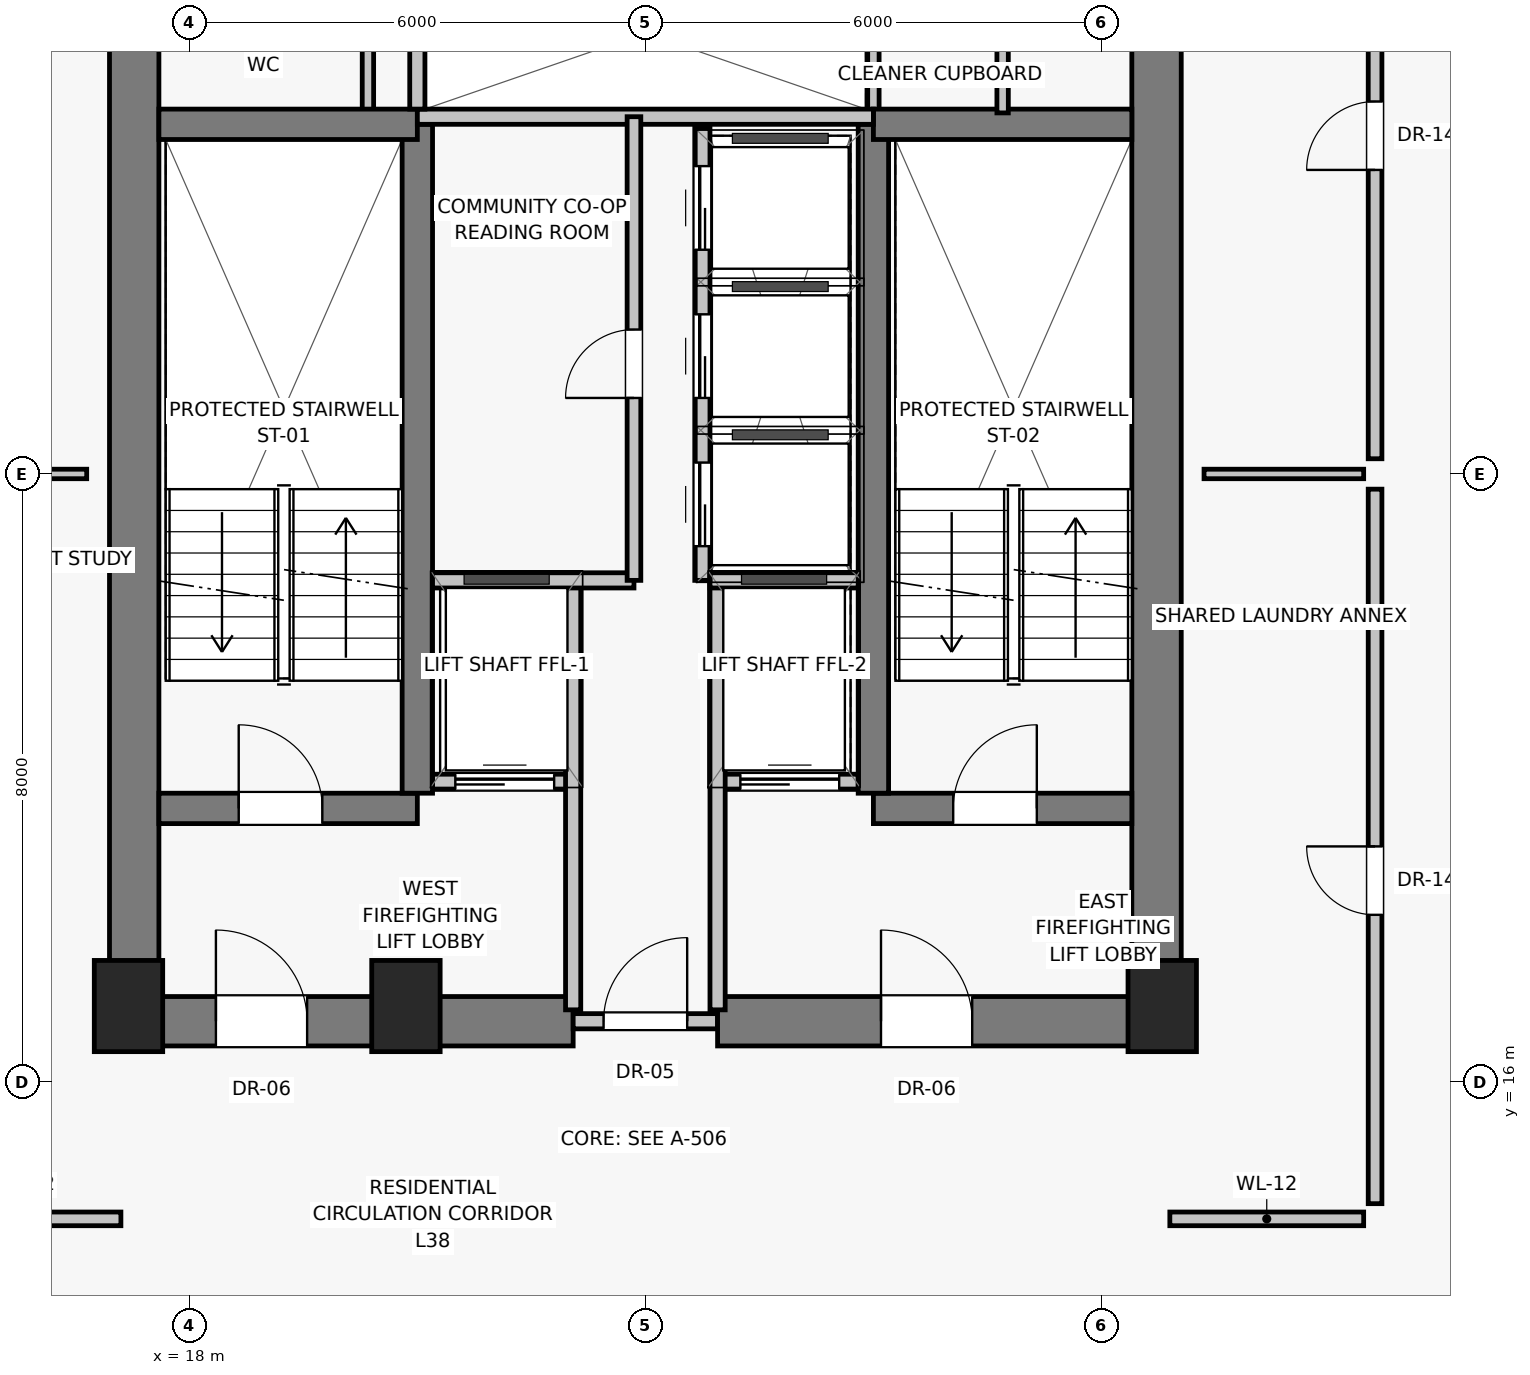
"""IFC4 building model, lengths in metres.
Left out: names, types, materials, properties, quantities, classifications, styles, units other than length and angle.
Written with IfcOpenShell. Run it as: python <this file> out.ifc"""

import sys

from ifc_helpers import new_model, si_unit, direction, frame, frame_2d, origin, origin_2d, place, context, subcontext, project, spatial, rectangle, extrude, source, transform, mapped, element, fill, save


model = new_model("IFC4")
c1 = context("Model", 3, precision=1e-05, world=origin(), true_north=direction((0.0, 1.0)))
c2 = subcontext(c1, "Body", "Model", "MODEL_VIEW")
j1 = project(units=[si_unit("LENGTHUNIT", "METRE"), si_unit("PLANEANGLEUNIT", "RADIAN")], contexts=[c1])
p1 = place(None, origin())
s1 = spatial("IfcSite", under=j1, at=p1, CompositionType="ELEMENT")
p2 = place(p1, origin())
s2 = spatial("IfcBuilding", under=s1, at=p2, CompositionType="ELEMENT")
p3 = place(p2, frame((0.0, 0.0, 136.0)))
s3 = spatial("IfcBuildingStorey", under=s2, at=p3, CompositionType="ELEMENT", Elevation=136.0)
for number, where, z_axis, x_axis in (
    (1, (17.2, 17.0, 0.0), (0.0, 0.0, 1.0), (1.0, 0.0, 0.0)),
    (2, (20.85, 17.0, 0.0), (0.0, 0.0, 1.0), (1.0, 0.0, 0.0)),
    (3, (30.8, 17.0, 0.0), (0.0, 0.0, 1.0), (1.0, 0.0, 0.0)),
):
    element("IfcColumn", number, at=place(p3, frame(where, z_axis=z_axis, x_axis=x_axis)), inside=s3, PredefinedType="PILASTER", context=c2, shape_type="SweptSolid", body=[
        extrude(rectangle(XDim=0.9, YDim=1.2, at=origin_2d()), origin(), (0.0, 0.0, 1.0), 3.25),
    ])
for number, where, z_axis, x_axis in (
    (4, (17.275, 16.8, 0.0), (0.0, 0.0, 1.0), (0.0, 1.0, 0.0)),
    (5, (30.725, 16.8, 0.0), (0.0, 0.0, 1.0), (0.0, 1.0, 0.0)),
):
    element("IfcWall", number, at=place(p3, frame(where, z_axis=z_axis, x_axis=x_axis)), inside=s3, PredefinedType="SHEAR", context=c2, shape_type="SweptSolid", body=[
        extrude(rectangle(XDim=14.2, YDim=0.65, at=frame_2d((7.1, 0.0))), origin(), (0.0, 0.0, 1.0), 3.0),
    ])
p4 = place(p3, frame((17.2, 16.8, 0.0), z_axis=(0.0, 0.0, 1.0), x_axis=(1.0, 0.0, 0.0)))
e6 = element("IfcWall", 6, at=p4, inside=s3, PredefinedType="SHEAR", context=c2, shape_type="SweptSolid", body=[
    extrude(rectangle(XDim=5.85, YDim=0.65, at=frame_2d((2.925, 0.0))), origin(), (0.0, 0.0, 1.0), 3.0),
])
p5 = place(p4, frame((1.15, 0.0, 0.0)))
e7 = element("IfcOpeningElement", 7, at=p5, cuts=e6, PredefinedType="OPENING", context=c2, shape_type="SweptSolid", body=[
    extrude(rectangle(XDim=1.2, YDim=2.03, at=frame_2d((0.6, 1.015))), frame((0.0, 0.335, 0.0), z_axis=(0.0, -1.0, 0.0), x_axis=(1.0, 0.0, 0.0)), (0.0, 0.0, 1.0), 0.67),
])
p6 = place(p3, frame((23.05, 16.8, 0.0), z_axis=(0.0, 0.0, 1.0), x_axis=(1.0, 0.0, 0.0)))
e8 = element("IfcWall", 8, at=p6, inside=s3, PredefinedType="SOLIDWALL", context=c2, shape_type="SweptSolid", body=[
    extrude(rectangle(XDim=1.9, YDim=0.2, at=frame_2d((0.95, 0.0))), origin(), (0.0, 0.0, 1.0), 2.15),
])
p7 = place(p6, frame((0.4, 0.0, 0.0)))
e9 = element("IfcOpeningElement", 9, at=p7, cuts=e8, PredefinedType="OPENING", context=c2, shape_type="SweptSolid", body=[
    extrude(rectangle(XDim=1.1, YDim=2.03, at=frame_2d((0.55, 1.015))), frame((0.0, 0.11, 0.0), z_axis=(0.0, -1.0, 0.0), x_axis=(1.0, 0.0, 0.0)), (0.0, 0.0, 1.0), 0.22),
])
p8 = place(p3, frame((24.95, 16.8, 0.0), z_axis=(0.0, 0.0, 1.0), x_axis=(1.0, 0.0, 0.0)))
e10 = element("IfcWall", 10, at=p8, inside=s3, PredefinedType="SHEAR", context=c2, shape_type="SweptSolid", body=[
    extrude(rectangle(XDim=5.85, YDim=0.65, at=frame_2d((2.925, 0.0))), origin(), (0.0, 0.0, 1.0), 3.0),
])
p9 = place(p8, frame((2.15, 0.0, 0.0)))
e11 = element("IfcOpeningElement", 11, at=p9, cuts=e10, PredefinedType="OPENING", context=c2, shape_type="SweptSolid", body=[
    extrude(rectangle(XDim=1.2, YDim=2.03, at=frame_2d((0.6, 1.015))), frame((0.0, 0.335, 0.0), z_axis=(0.0, -1.0, 0.0), x_axis=(1.0, 0.0, 0.0)), (0.0, 0.0, 1.0), 0.67),
])
for number, where, z_axis, x_axis in (
    (12, (20.35, 28.65, 0.0), (0.0, 0.0, 1.0), (0.0, 1.0, 0.0)),
    (13, (27.0, 28.65, 0.0), (0.0, 0.0, 1.0), (0.0, 1.0, 0.0)),
):
    element("IfcWall", number, at=place(p3, frame(where, z_axis=z_axis, x_axis=x_axis)), inside=s3, PredefinedType="PARTITIONING", context=c2, shape_type="SweptSolid", body=[
        extrude(rectangle(XDim=2.2, YDim=0.15, at=frame_2d((1.1, 0.0))), origin(), (0.0, 0.0, 1.0), 3.0),
    ])
p10 = place(p3, frame((17.6, 19.6, 0.0), z_axis=(0.0, 0.0, 1.0), x_axis=(1.0, 0.0, 0.0)))
e14 = element("IfcWall", 14, at=p10, inside=s3, PredefinedType="SHEAR", context=c2, shape_type="SweptSolid", body=[
    extrude(rectangle(XDim=3.4, YDim=0.4, at=frame_2d((1.7, 0.0))), origin(), (0.0, 0.0, 1.0), 3.0),
])
p11 = place(p10, frame((1.05, 0.0, 0.0)))
e15 = element("IfcOpeningElement", 15, at=p11, cuts=e14, PredefinedType="OPENING", context=c2, shape_type="SweptSolid", body=[
    extrude(rectangle(XDim=1.1, YDim=2.03, at=frame_2d((0.55, 1.015))), frame((0.0, 0.21, 0.0), z_axis=(0.0, -1.0, 0.0), x_axis=(1.0, 0.0, 0.0)), (0.0, 0.0, 1.0), 0.42),
])
p12 = place(p3, frame((21.2, 19.95, 0.0), z_axis=(0.0, 0.0, 1.0), x_axis=(1.0, 0.0, 0.0)))
e16 = element("IfcWall", 16, at=p12, inside=s3, PredefinedType="SOLIDWALL", context=c2, shape_type="SweptSolid", body=[
    extrude(rectangle(XDim=1.85, YDim=0.2, at=frame_2d((0.925, 0.0))), origin(), (0.0, 0.0, 1.0), 3.0),
])
p13 = place(p12, frame((0.3, 0.0, 0.0)))
e17 = element("IfcOpeningElement", 17, at=p13, cuts=e16, PredefinedType="OPENING", context=c2, shape_type="SweptSolid", body=[
    extrude(rectangle(XDim=1.3, YDim=2.25, at=frame_2d((0.65, 1.125))), frame((0.0, 0.11, 0.0), z_axis=(0.0, -1.0, 0.0), x_axis=(1.0, 0.0, 0.0)), (0.0, 0.0, 1.0), 0.22),
])
p14 = place(p3, frame((24.95, 19.95, 0.0), z_axis=(0.0, 0.0, 1.0), x_axis=(1.0, 0.0, 0.0)))
e18 = element("IfcWall", 18, at=p14, inside=s3, PredefinedType="SOLIDWALL", context=c2, shape_type="SweptSolid", body=[
    extrude(rectangle(XDim=1.85, YDim=0.2, at=frame_2d((0.925, 0.0))), origin(), (0.0, 0.0, 1.0), 3.0),
])
p15 = place(p14, frame((0.3, 0.0, 0.0)))
e19 = element("IfcOpeningElement", 19, at=p15, cuts=e18, PredefinedType="OPENING", context=c2, shape_type="SweptSolid", body=[
    extrude(rectangle(XDim=1.3, YDim=2.25, at=frame_2d((0.65, 1.125))), frame((0.0, 0.11, 0.0), z_axis=(0.0, -1.0, 0.0), x_axis=(1.0, 0.0, 0.0)), (0.0, 0.0, 1.0), 0.22),
])
p16 = place(p3, frame((27.0, 19.6, 0.0), z_axis=(0.0, 0.0, 1.0), x_axis=(1.0, 0.0, 0.0)))
e20 = element("IfcWall", 20, at=p16, inside=s3, PredefinedType="SHEAR", context=c2, shape_type="SweptSolid", body=[
    extrude(rectangle(XDim=3.4, YDim=0.4, at=frame_2d((1.7, 0.0))), origin(), (0.0, 0.0, 1.0), 3.0),
])
p17 = place(p16, frame((1.05, 0.0, 0.0)))
e21 = element("IfcOpeningElement", 21, at=p17, cuts=e20, PredefinedType="OPENING", context=c2, shape_type="SweptSolid", body=[
    extrude(rectangle(XDim=1.1, YDim=2.03, at=frame_2d((0.55, 1.015))), frame((0.0, 0.21, 0.0), z_axis=(0.0, -1.0, 0.0), x_axis=(1.0, 0.0, 0.0)), (0.0, 0.0, 1.0), 0.42),
])
for number, where, z_axis, x_axis in (
    (22, (21.0, 19.8, 0.0), (0.0, 0.0, 1.0), (0.0, 1.0, 0.0)),
    (23, (27.0, 19.8, 0.0), (0.0, 0.0, 1.0), (0.0, 1.0, 0.0)),
):
    element("IfcWall", number, at=place(p3, frame(where, z_axis=z_axis, x_axis=x_axis)), inside=s3, PredefinedType="SHEAR", context=c2, shape_type="SweptSolid", body=[
        extrude(rectangle(XDim=8.8, YDim=0.4, at=frame_2d((4.4, 0.0))), origin(), (0.0, 0.0, 1.0), 3.0),
    ])
for number, where, z_axis, x_axis in (
    (24, (17.6, 28.6, 0.0), (0.0, 0.0, 1.0), (1.0, 0.0, 0.0)),
    (25, (27.0, 28.6, 0.0), (0.0, 0.0, 1.0), (1.0, 0.0, 0.0)),
):
    element("IfcWall", number, at=place(p3, frame(where, z_axis=z_axis, x_axis=x_axis)), inside=s3, PredefinedType="SHEAR", context=c2, shape_type="SweptSolid", body=[
        extrude(rectangle(XDim=3.4, YDim=0.4, at=frame_2d((1.7, 0.0))), origin(), (0.0, 0.0, 1.0), 3.0),
    ])
for number, where, z_axis, x_axis in (
    (26, (23.05, 16.95, 0.0), (0.0, 0.0, 1.0), (0.0, 1.0, 0.0)),
    (27, (24.95, 16.95, 0.0), (0.0, 0.0, 1.0), (0.0, 1.0, 0.0)),
):
    element("IfcWall", number, at=place(p3, frame(where, z_axis=z_axis, x_axis=x_axis)), inside=s3, PredefinedType="SOLIDWALL", context=c2, shape_type="SweptSolid", body=[
        extrude(rectangle(XDim=5.6, YDim=0.2, at=frame_2d((2.8, 0.0))), origin(), (0.0, 0.0, 1.0), 3.0),
    ])
p18 = place(p3, frame((21.2, 22.6, 0.0), z_axis=(0.0, 0.0, 1.0), x_axis=(1.0, 0.0, 0.0)))
e28 = element("IfcWall", 28, at=p18, inside=s3, PredefinedType="SOLIDWALL", context=c2, shape_type="SweptSolid", body=[
    extrude(rectangle(XDim=2.65, YDim=0.2, at=frame_2d((1.325, 0.0))), origin(), (0.0, 0.0, 1.0), 3.0),
])
p19 = place(p3, frame((24.85, 22.6, 0.0), z_axis=(0.0, 0.0, 1.0), x_axis=(1.0, 0.0, 0.0)))
e29 = element("IfcWall", 29, at=p19, inside=s3, PredefinedType="SOLIDWALL", context=c2, shape_type="SweptSolid", body=[
    extrude(rectangle(XDim=1.95, YDim=0.2, at=frame_2d((0.975, 0.0))), origin(), (0.0, 0.0, 1.0), 3.0),
])
p20 = place(p3, frame((21.0, 28.7, 0.0), z_axis=(0.0, 0.0, 1.0), x_axis=(1.0, 0.0, 0.0)))
e30 = element("IfcWall", 30, at=p20, inside=s3, PredefinedType="SOLIDWALL", context=c2, shape_type="SweptSolid", body=[
    extrude(rectangle(XDim=6.0, YDim=0.2, at=frame_2d((3.0, 0.0))), origin(), (0.0, 0.0, 1.0), 3.0),
])
p21 = place(p3, frame((21.0, 28.8, 0.0), z_axis=(0.0, 0.0, 1.0), x_axis=(0.0, 1.0, 0.0)))
e31 = element("IfcWall", 31, at=p21, inside=s3, PredefinedType="SOLIDWALL", context=c2, shape_type="SweptSolid", body=[
    extrude(rectangle(XDim=1.6, YDim=0.2, at=frame_2d((0.8, 0.0))), origin(), (0.0, 0.0, 1.0), 3.0),
])
p22 = place(p3, frame((23.85, 22.6, 0.0), z_axis=(0.0, 0.0, 1.0), x_axis=(0.0, 1.0, 0.0)))
e32 = element("IfcWall", 32, at=p22, inside=s3, PredefinedType="PARTITIONING", context=c2, shape_type="SweptSolid", body=[
    extrude(rectangle(XDim=6.1, YDim=0.18, at=frame_2d((3.05, 0.0))), origin(), (0.0, 0.0, 1.0), 3.0),
])
p23 = place(p22, frame((2.4, 0.0, 0.0)))
e33 = element("IfcOpeningElement", 33, at=p23, cuts=e32, PredefinedType="OPENING", context=c2, shape_type="SweptSolid", body=[
    extrude(rectangle(XDim=0.9, YDim=2.01, at=frame_2d((0.45, 1.005))), frame((0.0, 0.1, 0.0), z_axis=(0.0, -1.0, 0.0), x_axis=(1.0, 0.0, 0.0)), (0.0, 0.0, 1.0), 0.2),
])
p24 = place(p3, frame((24.75, 22.6, 0.0), z_axis=(0.0, 0.0, 1.0), x_axis=(0.0, 1.0, 0.0)))
e34 = element("IfcWall", 34, at=p24, inside=s3, PredefinedType="SOLIDWALL", context=c2, shape_type="SweptSolid", body=[
    extrude(rectangle(XDim=5.95, YDim=0.2, at=frame_2d((2.975, 0.0))), origin(), (0.0, 0.0, 1.0), 3.0),
])
p25 = place(p24, frame((0.45, 0.0, 0.0)))
e35 = element("IfcOpeningElement", 35, at=p25, cuts=e34, PredefinedType="OPENING", context=c2, shape_type="SweptSolid", body=[
    extrude(rectangle(XDim=1.1, YDim=2.08, at=frame_2d((0.55, 1.04))), frame((0.0, 0.11, 0.0), z_axis=(0.0, -1.0, 0.0), x_axis=(1.0, 0.0, 0.0)), (0.0, 0.0, 1.0), 0.22),
])
p26 = place(p24, frame((2.4, 0.0, 0.0)))
e36 = element("IfcOpeningElement", 36, at=p26, cuts=e34, PredefinedType="OPENING", context=c2, shape_type="SweptSolid", body=[
    extrude(rectangle(XDim=1.1, YDim=2.08, at=frame_2d((0.55, 1.04))), frame((0.0, 0.11, 0.0), z_axis=(0.0, -1.0, 0.0), x_axis=(1.0, 0.0, 0.0)), (0.0, 0.0, 1.0), 0.22),
])
p27 = place(p24, frame((4.35, 0.0, 0.0)))
e37 = element("IfcOpeningElement", 37, at=p27, cuts=e34, PredefinedType="OPENING", context=c2, shape_type="SweptSolid", body=[
    extrude(rectangle(XDim=1.1, YDim=2.08, at=frame_2d((0.55, 1.04))), frame((0.0, 0.11, 0.0), z_axis=(0.0, -1.0, 0.0), x_axis=(1.0, 0.0, 0.0)), (0.0, 0.0, 1.0), 0.22),
])
p28 = place(p3, frame((28.7, 28.75, 0.0), z_axis=(0.0, 0.0, 1.0), x_axis=(0.0, 1.0, 0.0)))
e38 = element("IfcWall", 38, at=p28, inside=s3, PredefinedType="PARTITIONING", context=c2, shape_type="SweptSolid", body=[
    extrude(rectangle(XDim=2.0, YDim=0.15, at=frame_2d((1.0, 0.0))), origin(), (0.0, 0.0, 1.0), 3.0),
])
p29 = place(p3, frame((33.6, 14.4, 0.0), z_axis=(0.0, 0.0, 1.0), x_axis=(0.0, 1.0, 0.0)))
e39 = element("IfcWall", 39, at=p29, inside=s3, PredefinedType="PARTITIONING", context=c2, shape_type="SweptSolid", body=[
    extrude(rectangle(XDim=9.4, YDim=0.18, at=frame_2d((4.7, 0.0))), origin(), (0.0, 0.0, 1.0), 3.0),
])
p30 = place(p29, frame((3.8, 0.0, 0.0)))
e40 = element("IfcOpeningElement", 40, at=p30, cuts=e39, PredefinedType="OPENING", context=c2, shape_type="SweptSolid", body=[
    extrude(rectangle(XDim=0.9, YDim=2.01, at=frame_2d((0.45, 1.005))), frame((0.0, 0.1, 0.0), z_axis=(0.0, -1.0, 0.0), x_axis=(1.0, 0.0, 0.0)), (0.0, 0.0, 1.0), 0.2),
])
p31 = place(p3, frame((33.6, 24.2, 0.0), z_axis=(0.0, 0.0, 1.0), x_axis=(0.0, 1.0, 0.0)))
e41 = element("IfcWall", 41, at=p31, inside=s3, PredefinedType="PARTITIONING", context=c2, shape_type="SweptSolid", body=[
    extrude(rectangle(XDim=9.2, YDim=0.18, at=frame_2d((4.6, 0.0))), origin(), (0.0, 0.0, 1.0), 3.0),
])
p32 = place(p31, frame((3.8, 0.0, 0.0)))
e42 = element("IfcOpeningElement", 42, at=p32, cuts=e41, PredefinedType="OPENING", context=c2, shape_type="SweptSolid", body=[
    extrude(rectangle(XDim=0.9, YDim=2.01, at=frame_2d((0.45, 1.005))), frame((0.0, 0.1, 0.0), z_axis=(0.0, -1.0, 0.0), x_axis=(1.0, 0.0, 0.0)), (0.0, 0.0, 1.0), 0.2),
])
for number, where, z_axis, x_axis in (
    (43, (14.55, 24.0, 0.0), (0.0, 0.0, 1.0), (1.0, 0.0, 0.0)),
    (44, (31.35, 24.0, 0.0), (0.0, 0.0, 1.0), (1.0, 0.0, 0.0)),
):
    element("IfcWall", number, at=place(p3, frame(where, z_axis=z_axis, x_axis=x_axis)), inside=s3, PredefinedType="PARTITIONING", context=c2, shape_type="SweptSolid", body=[
        extrude(rectangle(XDim=2.1, YDim=0.125, at=frame_2d((1.05, 0.0))), origin(), (0.0, 0.0, 1.0), 3.0),
    ])
for number, where, z_axis, x_axis in (
    (45, (14.55, 14.2, 0.0), (0.0, 0.0, 1.0), (1.0, 0.0, 0.0)),
    (46, (30.9, 14.2, 0.0), (0.0, 0.0, 1.0), (1.0, 0.0, 0.0)),
):
    element("IfcWall", number, at=place(p3, frame(where, z_axis=z_axis, x_axis=x_axis)), inside=s3, PredefinedType="PARTITIONING", context=c2, shape_type="SweptSolid", body=[
        extrude(rectangle(XDim=2.55, YDim=0.18, at=frame_2d((1.275, 0.0))), origin(), (0.0, 0.0, 1.0), 3.0),
    ])
m1 = source(origin(), c2, "Body", "SweptSolid", [
    extrude(rectangle(XDim=1.2, YDim=2.03, at=frame_2d((0.6, 1.015))), frame((0.0, 0.025, 0.0), z_axis=(0.0, -1.0, 0.0), x_axis=(1.0, 0.0, 0.0)), (0.0, 0.0, 1.0), 0.05),
])
p33 = place(p5, origin())
e47 = element("IfcDoor", 47, at=p33, inside=s3, OperationType="SINGLE_SWING_LEFT", PredefinedType="DOOR", context=c2, shape_type="MappedRepresentation", body=[
    mapped(m1, transform((0.0, 0.0, 0.0), scale=1.0)),
])
fill(e7, e47)
m2 = source(origin(), c2, "Body", "SweptSolid", [
    extrude(rectangle(XDim=1.1, YDim=2.03, at=frame_2d((0.55, 1.015))), frame((0.0, 0.025, 0.0), z_axis=(0.0, -1.0, 0.0), x_axis=(1.0, 0.0, 0.0)), (0.0, 0.0, 1.0), 0.05),
])
p34 = place(p7, origin())
e48 = element("IfcDoor", 48, at=p34, inside=s3, OperationType="SINGLE_SWING_RIGHT", PredefinedType="DOOR", context=c2, shape_type="MappedRepresentation", body=[
    mapped(m2, transform((0.0, 0.0, 0.0), scale=1.0)),
])
fill(e9, e48)
p35 = place(p9, origin())
e49 = element("IfcDoor", 49, at=p35, inside=s3, OperationType="SINGLE_SWING_LEFT", PredefinedType="DOOR", context=c2, shape_type="MappedRepresentation", body=[
    mapped(m1, transform((0.0, 0.0, 0.0), scale=1.0)),
])
fill(e11, e49)
p36 = place(p11, origin())
e50 = element("IfcDoor", 50, at=p36, inside=s3, OperationType="SINGLE_SWING_LEFT", PredefinedType="DOOR", context=c2, shape_type="MappedRepresentation", body=[
    mapped(m2, transform((0.0, 0.0, 0.0), scale=1.0)),
])
fill(e15, e50)
m3 = source(origin(), c2, "Body", "SweptSolid", [
    extrude(rectangle(XDim=1.3, YDim=2.25, at=frame_2d((0.65, 1.125))), frame((0.0, 0.025, 0.0), z_axis=(0.0, -1.0, 0.0), x_axis=(1.0, 0.0, 0.0)), (0.0, 0.0, 1.0), 0.05),
])
p37 = place(p13, origin())
e51 = element("IfcDoor", 51, at=p37, inside=s3, OperationType="SLIDING_TO_LEFT", PredefinedType="DOOR", context=c2, shape_type="MappedRepresentation", body=[
    mapped(m3, transform((0.0, 0.0, 0.0), scale=1.0)),
])
fill(e17, e51)
p38 = place(p15, origin())
e52 = element("IfcDoor", 52, at=p38, inside=s3, OperationType="SLIDING_TO_LEFT", PredefinedType="DOOR", context=c2, shape_type="MappedRepresentation", body=[
    mapped(m3, transform((0.0, 0.0, 0.0), scale=1.0)),
])
fill(e19, e52)
p39 = place(p17, origin())
e53 = element("IfcDoor", 53, at=p39, inside=s3, OperationType="SINGLE_SWING_RIGHT", PredefinedType="DOOR", context=c2, shape_type="MappedRepresentation", body=[
    mapped(m2, transform((0.0, 0.0, 0.0), scale=1.0)),
])
fill(e21, e53)
m4 = source(origin(), c2, "Body", "SweptSolid", [
    extrude(rectangle(XDim=0.9, YDim=2.01, at=frame_2d((0.45, 1.005))), frame((0.0, 0.025, 0.0), z_axis=(0.0, -1.0, 0.0), x_axis=(1.0, 0.0, 0.0)), (0.0, 0.0, 1.0), 0.05),
])
p40 = place(p23, origin())
e54 = element("IfcDoor", 54, at=p40, inside=s3, OperationType="SINGLE_SWING_LEFT", PredefinedType="DOOR", context=c2, shape_type="MappedRepresentation", body=[
    mapped(m4, transform((0.0, 0.0, 0.0), scale=1.0)),
])
fill(e33, e54)
m5 = source(origin(), c2, "Body", "SweptSolid", [
    extrude(rectangle(XDim=1.1, YDim=2.08, at=frame_2d((0.55, 1.04))), frame((0.0, 0.025, 0.0), z_axis=(0.0, -1.0, 0.0), x_axis=(1.0, 0.0, 0.0)), (0.0, 0.0, 1.0), 0.05),
])
p41 = place(p25, origin())
e55 = element("IfcDoor", 55, at=p41, inside=s3, OperationType="SLIDING_TO_LEFT", PredefinedType="DOOR", context=c2, shape_type="MappedRepresentation", body=[
    mapped(m5, transform((0.0, 0.0, 0.0), scale=1.0)),
])
fill(e35, e55)
p42 = place(p26, origin())
e56 = element("IfcDoor", 56, at=p42, inside=s3, OperationType="SLIDING_TO_LEFT", PredefinedType="DOOR", context=c2, shape_type="MappedRepresentation", body=[
    mapped(m5, transform((0.0, 0.0, 0.0), scale=1.0)),
])
fill(e36, e56)
p43 = place(p27, origin())
e57 = element("IfcDoor", 57, at=p43, inside=s3, OperationType="SLIDING_TO_LEFT", PredefinedType="DOOR", context=c2, shape_type="MappedRepresentation", body=[
    mapped(m5, transform((0.0, 0.0, 0.0), scale=1.0)),
])
fill(e37, e57)
p44 = place(p30, origin())
e58 = element("IfcDoor", 58, at=p44, inside=s3, OperationType="SINGLE_SWING_RIGHT", PredefinedType="DOOR", context=c2, shape_type="MappedRepresentation", body=[
    mapped(m4, transform((0.0, 0.0, 0.0), scale=1.0)),
])
fill(e40, e58)
p45 = place(p32, origin())
e59 = element("IfcDoor", 59, at=p45, inside=s3, OperationType="SINGLE_SWING_LEFT", PredefinedType="DOOR", context=c2, shape_type="MappedRepresentation", body=[
    mapped(m4, transform((0.0, 0.0, 0.0), scale=1.0)),
])
fill(e42, e59)
save(model, sys.argv[1])
